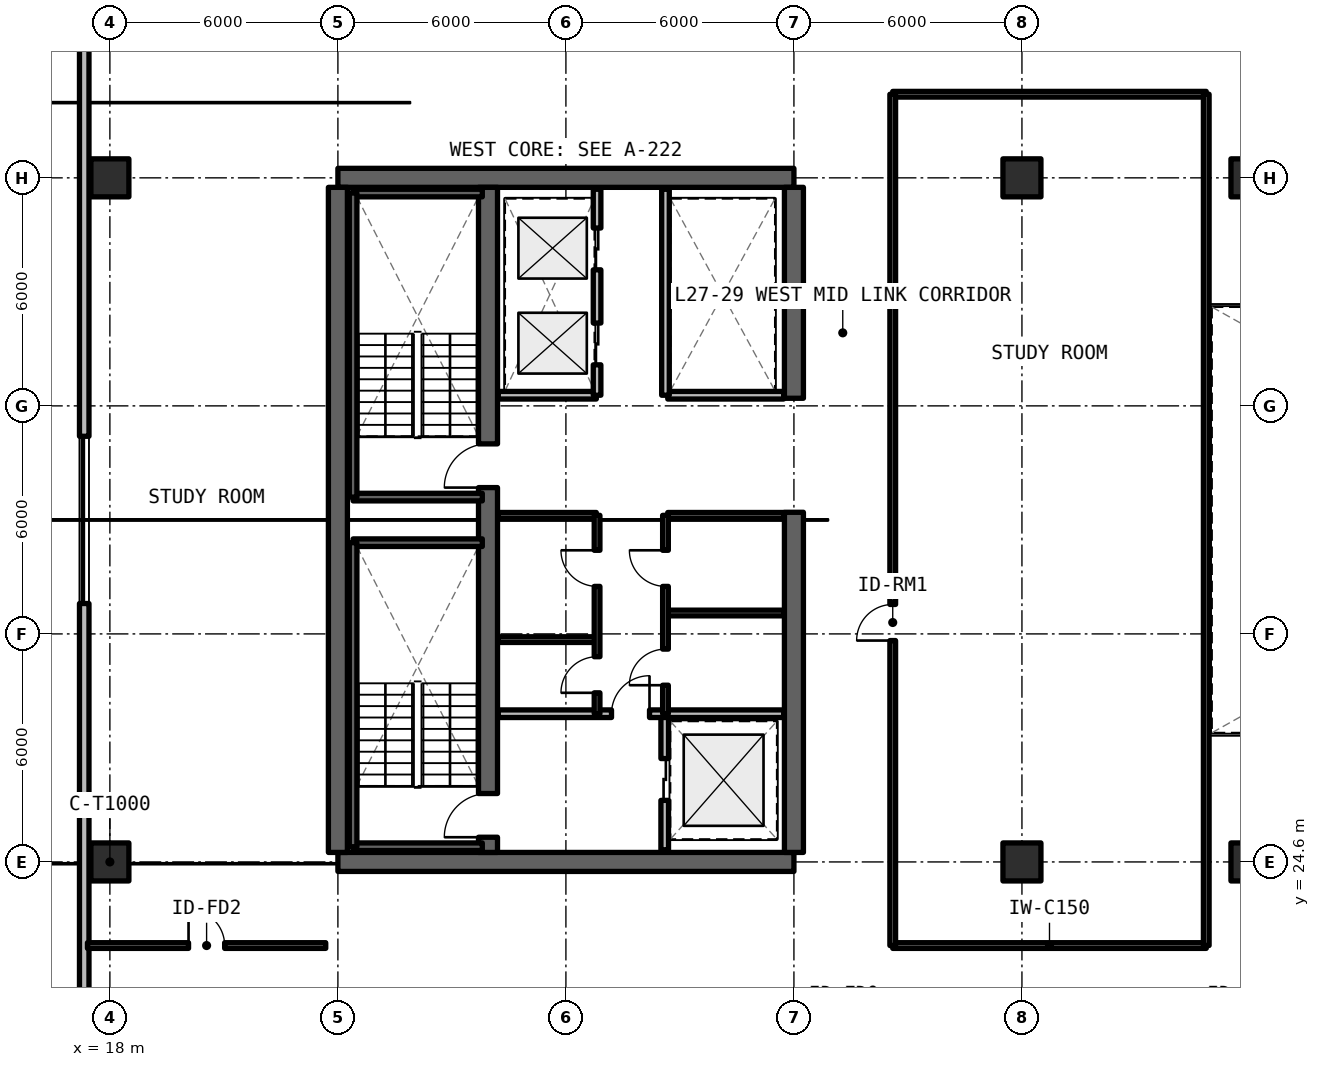
"""IFC4 building model, lengths in metres.
Left out: names, types, materials, properties, quantities, classifications, styles, units other than length and angle.
Written with IfcOpenShell. Run it as: python <this file> out.ifc"""

import sys

from ifc_helpers import new_model, si_unit, direction, frame, frame_2d, origin, origin_2d, place, context, subcontext, project, spatial, rectangle, extrude, element, fill, save


model = new_model("IFC4")
c1 = context("Model", 3, precision=1e-05, world=origin(), true_north=direction((0.0, 1.0)))
c2 = subcontext(c1, "Body", "Model", "MODEL_VIEW")
j1 = project(units=[si_unit("LENGTHUNIT", "METRE"), si_unit("PLANEANGLEUNIT", "RADIAN")], contexts=[c1])
p1 = place(None, origin())
s1 = spatial("IfcSite", under=j1, at=p1, CompositionType="ELEMENT")
p2 = place(p1, origin())
s2 = spatial("IfcBuilding", under=s1, at=p2, CompositionType="ELEMENT")
p3 = place(p2, frame((0.0, 0.0, 98.67)))
s3 = spatial("IfcBuildingStorey", under=s2, at=p3, CompositionType="ELEMENT", Elevation=98.67)
for number, where, z_axis, x_axis in (
    (1, (24.0, 24.6, 0.0), (0.0, 0.0, 1.0), (1.0, 0.0, 0.0)),
    (2, (36.0, 42.6, 0.0), (0.0, 0.0, 1.0), (-1.0, 0.0, 0.0)),
):
    element("IfcWall", number, at=place(p3, frame(where, z_axis=z_axis, x_axis=x_axis)), inside=s3, PredefinedType="SHEAR", context=c2, shape_type="SweptSolid", body=[
        extrude(rectangle(XDim=12.0, YDim=0.5, at=frame_2d((6.0, 0.0))), origin(), (0.0, 0.0, 1.0), 3.3),
    ])
p4 = place(p3, frame((24.0, 24.85, 0.0), z_axis=(0.0, 0.0, 1.0), x_axis=(0.0, 1.0, 0.0)))
e3 = element("IfcWall", 3, at=p4, inside=s3, PredefinedType="SHEAR", context=c2, shape_type="SweptSolid", body=[
    extrude(rectangle(XDim=17.5, YDim=0.5, at=frame_2d((8.75, 0.0))), origin(), (0.0, 0.0, 1.0), 3.3),
])
p5 = place(p3, frame((36.0, 24.85, 0.0), z_axis=(0.0, 0.0, 1.0), x_axis=(0.0, 1.0, 0.0)))
e4 = element("IfcWall", 4, at=p5, inside=s3, PredefinedType="SHEAR", context=c2, shape_type="SweptSolid", body=[
    extrude(rectangle(XDim=8.95, YDim=0.5, at=frame_2d((4.475, 0.0))), origin(), (0.0, 0.0, 1.0), 3.3),
])
p6 = place(p3, frame((36.0, 36.8, 0.0), z_axis=(0.0, 0.0, 1.0), x_axis=(0.0, 1.0, 0.0)))
e5 = element("IfcWall", 5, at=p6, inside=s3, PredefinedType="SHEAR", context=c2, shape_type="SweptSolid", body=[
    extrude(rectangle(XDim=5.55, YDim=0.5, at=frame_2d((2.775, 0.0))), origin(), (0.0, 0.0, 1.0), 3.3),
])
p7 = place(p3, frame((27.95, 24.85, 0.0), z_axis=(0.0, 0.0, 1.0), x_axis=(0.0, 1.0, 0.0)))
e6 = element("IfcWall", 6, at=p7, inside=s3, PredefinedType="SHEAR", context=c2, shape_type="SweptSolid", body=[
    extrude(rectangle(XDim=17.5, YDim=0.5, at=frame_2d((8.75, 0.0))), origin(), (0.0, 0.0, 1.0), 3.3),
])
p8 = place(p7, frame((0.4, 0.0, 0.0)))
e7 = element("IfcOpeningElement", 7, at=p8, cuts=e6, PredefinedType="OPENING", context=c2, shape_type="SweptSolid", body=[
    extrude(rectangle(XDim=1.15, YDim=2.15, at=frame_2d((0.575, 1.075))), frame((0.0, 0.26, 0.0), z_axis=(0.0, -1.0, 0.0), x_axis=(1.0, 0.0, 0.0)), (0.0, 0.0, 1.0), 0.52),
])
p9 = place(p7, frame((9.6, 0.0, 0.0)))
e8 = element("IfcOpeningElement", 8, at=p9, cuts=e6, PredefinedType="OPENING", context=c2, shape_type="SweptSolid", body=[
    extrude(rectangle(XDim=1.15, YDim=2.15, at=frame_2d((0.575, 1.075))), frame((0.0, 0.26, 0.0), z_axis=(0.0, -1.0, 0.0), x_axis=(1.0, 0.0, 0.0)), (0.0, 0.0, 1.0), 0.52),
])
for number, where, z_axis, x_axis in (
    (9, (18.0, 24.6, 0.0), (0.0, 0.0, 1.0), (1.0, 0.0, 0.0)),
    (10, (18.0, 42.6, 0.0), (0.0, 0.0, 1.0), (1.0, 0.0, 0.0)),
    (11, (42.0, 24.6, 0.0), (0.0, 0.0, 1.0), (1.0, 0.0, 0.0)),
    (12, (42.0, 42.6, 0.0), (0.0, 0.0, 1.0), (1.0, 0.0, 0.0)),
    (13, (48.0, 24.6, 0.0), (0.0, 0.0, 1.0), (1.0, 0.0, 0.0)),
    (14, (48.0, 42.6, 0.0), (0.0, 0.0, 1.0), (1.0, 0.0, 0.0)),
):
    element("IfcColumn", number, at=place(p3, frame(where, z_axis=z_axis, x_axis=x_axis)), inside=s3, PredefinedType="COLUMN", context=c2, shape_type="SweptSolid", body=[
        extrude(rectangle(XDim=1.0, YDim=1.0, at=origin_2d()), origin(), (0.0, 0.0, 1.0), 3.3),
    ])
p10 = place(p3, frame((17.325, 53.348, 0.0), z_axis=(0.0, 0.0, 1.0), x_axis=(0.0, -1.0, 0.0)))
e15 = element("IfcWall", 15, at=p10, inside=s3, PredefinedType="SOLIDWALL", context=c2, shape_type="SweptSolid", body=[
    extrude(rectangle(XDim=39.496, YDim=0.25, at=frame_2d((19.748, 0.0))), origin(), (0.0, 0.0, 1.0), 3.08),
])
p11 = place(p10, frame((17.548, 0.0, 0.78)))
e16 = element("IfcOpeningElement", 16, at=p11, cuts=e15, PredefinedType="OPENING", context=c2, shape_type="SweptSolid", body=[
    extrude(rectangle(XDim=4.4, YDim=1.66, at=frame_2d((2.2, 0.83))), frame((0.0, 0.135, 0.0), z_axis=(0.0, -1.0, 0.0), x_axis=(1.0, 0.0, 0.0)), (0.0, 0.0, 1.0), 0.27),
])
p12 = place(p10, frame((35.642, 0.0, 0.78)))
e17 = element("IfcOpeningElement", 17, at=p12, cuts=e15, PredefinedType="OPENING", context=c2, shape_type="SweptSolid", body=[
    extrude(rectangle(XDim=1.4, YDim=1.65, at=frame_2d((0.7, 0.825))), frame((0.0, 0.135, 0.0), z_axis=(0.0, -1.0, 0.0), x_axis=(1.0, 0.0, 0.0)), (0.0, 0.0, 1.0), 0.27),
])
p13 = place(p3, frame((32.6, 24.92, 0.0), z_axis=(0.0, 0.0, 1.0), x_axis=(0.0, 1.0, 0.0)))
e18 = element("IfcWall", 18, at=p13, inside=s3, PredefinedType="SOLIDWALL", context=c2, shape_type="SweptSolid", body=[
    extrude(rectangle(XDim=3.58, YDim=0.2, at=frame_2d((1.79, 0.0))), origin(), (0.0, 0.0, 1.0), 2.35),
])
p14 = place(p13, frame((1.3, 0.0, 0.0)))
e19 = element("IfcOpeningElement", 19, at=p14, cuts=e18, PredefinedType="OPENING", context=c2, shape_type="SweptSolid", body=[
    extrude(rectangle(XDim=1.1, YDim=2.2, at=frame_2d((0.55, 1.1))), frame((0.0, 0.11, 0.0), z_axis=(0.0, -1.0, 0.0), x_axis=(1.0, 0.0, 0.0)), (0.0, 0.0, 1.0), 0.22),
])
p15 = place(p3, frame((28.22, 28.5, 0.0), z_axis=(0.0, 0.0, 1.0), x_axis=(1.0, 0.0, 0.0)))
e20 = element("IfcWall", 20, at=p15, inside=s3, PredefinedType="SOLIDWALL", context=c2, shape_type="SweptSolid", body=[
    extrude(rectangle(XDim=7.51, YDim=0.2, at=frame_2d((3.755, 0.0))), origin(), (0.0, 0.0, 1.0), 2.35),
])
p16 = place(p15, frame((2.98, 0.0, 0.0)))
e21 = element("IfcOpeningElement", 21, at=p16, cuts=e20, PredefinedType="OPENING", context=c2, shape_type="SweptSolid", body=[
    extrude(rectangle(XDim=1.0, YDim=2.15, at=frame_2d((0.5, 1.075))), frame((0.0, 0.11, 0.0), z_axis=(0.0, -1.0, 0.0), x_axis=(1.0, 0.0, 0.0)), (0.0, 0.0, 1.0), 0.22),
])
for number, where, z_axis, x_axis in (
    (22, (28.22, 30.45, 0.0), (0.0, 0.0, 1.0), (1.0, 0.0, 0.0)),
    (23, (28.22, 33.72, 0.0), (0.0, 0.0, 1.0), (1.0, 0.0, 0.0)),
):
    element("IfcWall", number, at=place(p3, frame(where, z_axis=z_axis, x_axis=x_axis)), inside=s3, PredefinedType="SOLIDWALL", context=c2, shape_type="SweptSolid", body=[
        extrude(rectangle(XDim=2.58, YDim=0.15, at=frame_2d((1.29, 0.0))), origin(), (0.0, 0.0, 1.0), 2.35),
    ])
p17 = place(p3, frame((30.82, 28.5, 0.0), z_axis=(0.0, 0.0, 1.0), x_axis=(0.0, 1.0, 0.0)))
e24 = element("IfcWall", 24, at=p17, inside=s3, PredefinedType="SOLIDWALL", context=c2, shape_type="SweptSolid", body=[
    extrude(rectangle(XDim=5.22, YDim=0.15, at=frame_2d((2.61, 0.0))), origin(), (0.0, 0.0, 1.0), 2.35),
])
p18 = place(p17, frame((0.55, 0.0, 0.0)))
e25 = element("IfcOpeningElement", 25, at=p18, cuts=e24, PredefinedType="OPENING", context=c2, shape_type="SweptSolid", body=[
    extrude(rectangle(XDim=0.95, YDim=2.15, at=frame_2d((0.475, 1.075))), frame((0.0, 0.085, 0.0), z_axis=(0.0, -1.0, 0.0), x_axis=(1.0, 0.0, 0.0)), (0.0, 0.0, 1.0), 0.17),
])
p19 = place(p17, frame((3.35, 0.0, 0.0)))
e26 = element("IfcOpeningElement", 26, at=p19, cuts=e24, PredefinedType="OPENING", context=c2, shape_type="SweptSolid", body=[
    extrude(rectangle(XDim=0.95, YDim=2.15, at=frame_2d((0.475, 1.075))), frame((0.0, 0.085, 0.0), z_axis=(0.0, -1.0, 0.0), x_axis=(1.0, 0.0, 0.0)), (0.0, 0.0, 1.0), 0.17),
])
for number, where, z_axis, x_axis in (
    (27, (32.68, 31.15, 0.0), (0.0, 0.0, 1.0), (1.0, 0.0, 0.0)),
    (28, (32.68, 33.72, 0.0), (0.0, 0.0, 1.0), (1.0, 0.0, 0.0)),
):
    element("IfcWall", number, at=place(p3, frame(where, z_axis=z_axis, x_axis=x_axis)), inside=s3, PredefinedType="SOLIDWALL", context=c2, shape_type="SweptSolid", body=[
        extrude(rectangle(XDim=3.05, YDim=0.15, at=frame_2d((1.525, 0.0))), origin(), (0.0, 0.0, 1.0), 2.35),
    ])
p20 = place(p3, frame((32.62, 28.5, 0.0), z_axis=(0.0, 0.0, 1.0), x_axis=(0.0, 1.0, 0.0)))
e29 = element("IfcWall", 29, at=p20, inside=s3, PredefinedType="SOLIDWALL", context=c2, shape_type="SweptSolid", body=[
    extrude(rectangle(XDim=5.22, YDim=0.15, at=frame_2d((2.61, 0.0))), origin(), (0.0, 0.0, 1.0), 2.35),
])
p21 = place(p20, frame((0.75, 0.0, 0.0)))
e30 = element("IfcOpeningElement", 30, at=p21, cuts=e29, PredefinedType="OPENING", context=c2, shape_type="SweptSolid", body=[
    extrude(rectangle(XDim=0.95, YDim=2.15, at=frame_2d((0.475, 1.075))), frame((0.0, 0.085, 0.0), z_axis=(0.0, -1.0, 0.0), x_axis=(1.0, 0.0, 0.0)), (0.0, 0.0, 1.0), 0.17),
])
p22 = place(p20, frame((3.35, 0.0, 0.0)))
e31 = element("IfcOpeningElement", 31, at=p22, cuts=e29, PredefinedType="OPENING", context=c2, shape_type="SweptSolid", body=[
    extrude(rectangle(XDim=0.95, YDim=2.15, at=frame_2d((0.475, 1.075))), frame((0.0, 0.085, 0.0), z_axis=(0.0, -1.0, 0.0), x_axis=(1.0, 0.0, 0.0)), (0.0, 0.0, 1.0), 0.17),
])
p23 = place(p3, frame((28.22, 36.88, 0.0), z_axis=(0.0, 0.0, 1.0), x_axis=(1.0, 0.0, 0.0)))
e32 = element("IfcWall", 32, at=p23, inside=s3, PredefinedType="SOLIDWALL", context=c2, shape_type="SweptSolid", body=[
    extrude(rectangle(XDim=2.58, YDim=0.2, at=frame_2d((1.29, 0.0))), origin(), (0.0, 0.0, 1.0), 2.35),
])
p24 = place(p3, frame((30.82, 36.88, 0.0), z_axis=(0.0, 0.0, 1.0), x_axis=(0.0, 1.0, 0.0)))
e33 = element("IfcWall", 33, at=p24, inside=s3, PredefinedType="SOLIDWALL", context=c2, shape_type="SweptSolid", body=[
    extrude(rectangle(XDim=5.42, YDim=0.2, at=frame_2d((2.71, 0.0))), origin(), (0.0, 0.0, 1.0), 2.35),
])
p25 = place(p24, frame((0.8, 0.0, 0.0)))
e34 = element("IfcOpeningElement", 34, at=p25, cuts=e33, PredefinedType="OPENING", context=c2, shape_type="SweptSolid", body=[
    extrude(rectangle(XDim=1.1, YDim=2.2, at=frame_2d((0.55, 1.1))), frame((0.0, 0.11, 0.0), z_axis=(0.0, -1.0, 0.0), x_axis=(1.0, 0.0, 0.0)), (0.0, 0.0, 1.0), 0.22),
])
p26 = place(p24, frame((3.3, 0.0, 0.0)))
e35 = element("IfcOpeningElement", 35, at=p26, cuts=e33, PredefinedType="OPENING", context=c2, shape_type="SweptSolid", body=[
    extrude(rectangle(XDim=1.1, YDim=2.2, at=frame_2d((0.55, 1.1))), frame((0.0, 0.11, 0.0), z_axis=(0.0, -1.0, 0.0), x_axis=(1.0, 0.0, 0.0)), (0.0, 0.0, 1.0), 0.22),
])
p27 = place(p3, frame((32.68, 36.88, 0.0), z_axis=(0.0, 0.0, 1.0), x_axis=(1.0, 0.0, 0.0)))
e36 = element("IfcWall", 36, at=p27, inside=s3, PredefinedType="SOLIDWALL", context=c2, shape_type="SweptSolid", body=[
    extrude(rectangle(XDim=3.05, YDim=0.2, at=frame_2d((1.525, 0.0))), origin(), (0.0, 0.0, 1.0), 2.35),
])
p28 = place(p3, frame((32.62, 36.88, 0.0), z_axis=(0.0, 0.0, 1.0), x_axis=(0.0, 1.0, 0.0)))
e37 = element("IfcWall", 37, at=p28, inside=s3, PredefinedType="SOLIDWALL", context=c2, shape_type="SweptSolid", body=[
    extrude(rectangle(XDim=5.42, YDim=0.2, at=frame_2d((2.71, 0.0))), origin(), (0.0, 0.0, 1.0), 2.35),
])
for number, where, z_axis, x_axis in (
    (38, (38.6, 22.4, 0.0), (0.0, 0.0, 1.0), (1.0, 0.0, 0.0)),
    (39, (38.6, 44.8, 0.0), (0.0, 0.0, 1.0), (1.0, 0.0, 0.0)),
):
    element("IfcWall", number, at=place(p3, frame(where, z_axis=z_axis, x_axis=x_axis)), inside=s3, PredefinedType="SOLIDWALL", context=c2, shape_type="SweptSolid", body=[
        extrude(rectangle(XDim=8.25, YDim=0.15, at=frame_2d((4.125, 0.0))), origin(), (0.0, 0.0, 1.0), 2.35),
    ])
p29 = place(p3, frame((38.6, 22.4, 0.0), z_axis=(0.0, 0.0, 1.0), x_axis=(0.0, 1.0, 0.0)))
e40 = element("IfcWall", 40, at=p29, inside=s3, PredefinedType="SOLIDWALL", context=c2, shape_type="SweptSolid", body=[
    extrude(rectangle(XDim=22.4, YDim=0.15, at=frame_2d((11.2, 0.0))), origin(), (0.0, 0.0, 1.0), 2.35),
])
p30 = place(p29, frame((8.025, 0.0, 0.0)))
e41 = element("IfcOpeningElement", 41, at=p30, cuts=e40, PredefinedType="OPENING", context=c2, shape_type="SweptSolid", body=[
    extrude(rectangle(XDim=0.95, YDim=2.15, at=frame_2d((0.475, 1.075))), frame((0.0, 0.085, 0.0), z_axis=(0.0, -1.0, 0.0), x_axis=(1.0, 0.0, 0.0)), (0.0, 0.0, 1.0), 0.17),
])
p31 = place(p3, frame((46.85, 22.4, 0.0), z_axis=(0.0, 0.0, 1.0), x_axis=(0.0, 1.0, 0.0)))
e42 = element("IfcWall", 42, at=p31, inside=s3, PredefinedType="SOLIDWALL", context=c2, shape_type="SweptSolid", body=[
    extrude(rectangle(XDim=22.4, YDim=0.15, at=frame_2d((11.2, 0.0))), origin(), (0.0, 0.0, 1.0), 2.35),
])
p32 = place(p3, frame((17.41, 22.4, 0.0), z_axis=(0.0, 0.0, 1.0), x_axis=(1.0, 0.0, 0.0)))
e43 = element("IfcWall", 43, at=p32, inside=s3, PredefinedType="SOLIDWALL", context=c2, shape_type="SweptSolid", body=[
    extrude(rectangle(XDim=6.27, YDim=0.15, at=frame_2d((3.135, 0.0))), origin(), (0.0, 0.0, 1.0), 2.35),
])
p33 = place(p32, frame((2.66, 0.0, 0.0)))
e44 = element("IfcOpeningElement", 44, at=p33, cuts=e43, PredefinedType="OPENING", context=c2, shape_type="SweptSolid", body=[
    extrude(rectangle(XDim=0.95, YDim=2.15, at=frame_2d((0.475, 1.075))), frame((0.0, 0.085, 0.0), z_axis=(0.0, -1.0, 0.0), x_axis=(1.0, 0.0, 0.0)), (0.0, 0.0, 1.0), 0.17),
])
for number, where, z_axis, x_axis in (
    (45, (24.4, 25.0, 0.0), (0.0, 0.0, 1.0), (1.0, 0.0, 0.0)),
    (46, (27.8, 33.0, 0.0), (0.0, 0.0, 1.0), (-1.0, 0.0, 0.0)),
):
    element("IfcWall", number, at=place(p3, frame(where, z_axis=z_axis, x_axis=x_axis)), inside=s3, PredefinedType="SOLIDWALL", context=c2, shape_type="SweptSolid", body=[
        extrude(rectangle(XDim=3.4, YDim=0.2, at=frame_2d((1.7, 0.0))), origin(), (0.0, 0.0, 1.0), 3.3),
    ])
p34 = place(p3, frame((24.4, 33.0, 0.0), z_axis=(0.0, 0.0, 1.0), x_axis=(0.0, -1.0, 0.0)))
e47 = element("IfcWall", 47, at=p34, inside=s3, PredefinedType="SOLIDWALL", context=c2, shape_type="SweptSolid", body=[
    extrude(rectangle(XDim=8.0, YDim=0.2, at=frame_2d((4.0, 0.0))), origin(), (0.0, 0.0, 1.0), 3.3),
])
for number, where, z_axis, x_axis in (
    (48, (24.4, 34.2, 0.0), (0.0, 0.0, 1.0), (1.0, 0.0, 0.0)),
    (49, (27.8, 42.2, 0.0), (0.0, 0.0, 1.0), (-1.0, 0.0, 0.0)),
):
    element("IfcWall", number, at=place(p3, frame(where, z_axis=z_axis, x_axis=x_axis)), inside=s3, PredefinedType="SOLIDWALL", context=c2, shape_type="SweptSolid", body=[
        extrude(rectangle(XDim=3.4, YDim=0.2, at=frame_2d((1.7, 0.0))), origin(), (0.0, 0.0, 1.0), 3.3),
    ])
p35 = place(p3, frame((24.4, 42.2, 0.0), z_axis=(0.0, 0.0, 1.0), x_axis=(0.0, -1.0, 0.0)))
e50 = element("IfcWall", 50, at=p35, inside=s3, PredefinedType="SOLIDWALL", context=c2, shape_type="SweptSolid", body=[
    extrude(rectangle(XDim=8.0, YDim=0.2, at=frame_2d((4.0, 0.0))), origin(), (0.0, 0.0, 1.0), 3.3),
])
p36 = place(p11, origin())
e51 = element("IfcWindow", 51, at=p36, inside=s3, PartitioningType="SINGLE_PANEL", PredefinedType="WINDOW", context=c2, shape_type="SweptSolid", body=[
    extrude(rectangle(XDim=4.4, YDim=1.66, at=frame_2d((2.2, 0.83))), frame((0.0, 0.03, 0.0), z_axis=(0.0, -1.0, 0.0), x_axis=(1.0, 0.0, 0.0)), (0.0, 0.0, 1.0), 0.06),
])
fill(e16, e51)
p37 = place(p14, origin())
e52 = element("IfcDoor", 52, at=p37, inside=s3, OperationType="SLIDING_TO_LEFT", PredefinedType="DOOR", context=c2, shape_type="SweptSolid", body=[
    extrude(rectangle(XDim=1.1, YDim=2.2, at=frame_2d((0.55, 1.1))), frame((0.0, 0.025, 0.0), z_axis=(0.0, -1.0, 0.0), x_axis=(1.0, 0.0, 0.0)), (0.0, 0.0, 1.0), 0.05),
])
fill(e19, e52)
p38 = place(p16, origin())
e53 = element("IfcDoor", 53, at=p38, inside=s3, OperationType="SINGLE_SWING_RIGHT", PredefinedType="DOOR", context=c2, shape_type="SweptSolid", body=[
    extrude(rectangle(XDim=1.0, YDim=2.15, at=frame_2d((0.5, 1.075))), frame((0.0, 0.025, 0.0), z_axis=(0.0, -1.0, 0.0), x_axis=(1.0, 0.0, 0.0)), (0.0, 0.0, 1.0), 0.05),
])
fill(e21, e53)
p39 = place(p18, origin())
e54 = element("IfcDoor", 54, at=p39, inside=s3, OperationType="SINGLE_SWING_LEFT", PredefinedType="DOOR", context=c2, shape_type="SweptSolid", body=[
    extrude(rectangle(XDim=0.95, YDim=2.15, at=frame_2d((0.475, 1.075))), frame((0.0, 0.025, 0.0), z_axis=(0.0, -1.0, 0.0), x_axis=(1.0, 0.0, 0.0)), (0.0, 0.0, 1.0), 0.05),
])
fill(e25, e54)
p40 = place(p19, origin())
e55 = element("IfcDoor", 55, at=p40, inside=s3, OperationType="SINGLE_SWING_RIGHT", PredefinedType="DOOR", context=c2, shape_type="SweptSolid", body=[
    extrude(rectangle(XDim=0.95, YDim=2.15, at=frame_2d((0.475, 1.075))), frame((0.0, 0.025, 0.0), z_axis=(0.0, -1.0, 0.0), x_axis=(1.0, 0.0, 0.0)), (0.0, 0.0, 1.0), 0.05),
])
fill(e26, e55)
p41 = place(p21, origin())
e56 = element("IfcDoor", 56, at=p41, inside=s3, OperationType="SINGLE_SWING_LEFT", PredefinedType="DOOR", context=c2, shape_type="SweptSolid", body=[
    extrude(rectangle(XDim=0.95, YDim=2.15, at=frame_2d((0.475, 1.075))), frame((0.0, 0.025, 0.0), z_axis=(0.0, -1.0, 0.0), x_axis=(1.0, 0.0, 0.0)), (0.0, 0.0, 1.0), 0.05),
])
fill(e30, e56)
p42 = place(p22, origin())
e57 = element("IfcDoor", 57, at=p42, inside=s3, OperationType="SINGLE_SWING_RIGHT", PredefinedType="DOOR", context=c2, shape_type="SweptSolid", body=[
    extrude(rectangle(XDim=0.95, YDim=2.15, at=frame_2d((0.475, 1.075))), frame((0.0, 0.025, 0.0), z_axis=(0.0, -1.0, 0.0), x_axis=(1.0, 0.0, 0.0)), (0.0, 0.0, 1.0), 0.05),
])
fill(e31, e57)
p43 = place(p25, origin())
e58 = element("IfcDoor", 58, at=p43, inside=s3, OperationType="SLIDING_TO_LEFT", PredefinedType="DOOR", context=c2, shape_type="SweptSolid", body=[
    extrude(rectangle(XDim=1.1, YDim=2.2, at=frame_2d((0.55, 1.1))), frame((0.0, 0.025, 0.0), z_axis=(0.0, -1.0, 0.0), x_axis=(1.0, 0.0, 0.0)), (0.0, 0.0, 1.0), 0.05),
])
fill(e34, e58)
p44 = place(p26, origin())
e59 = element("IfcDoor", 59, at=p44, inside=s3, OperationType="SLIDING_TO_RIGHT", PredefinedType="DOOR", context=c2, shape_type="SweptSolid", body=[
    extrude(rectangle(XDim=1.1, YDim=2.2, at=frame_2d((0.55, 1.1))), frame((0.0, 0.025, 0.0), z_axis=(0.0, -1.0, 0.0), x_axis=(1.0, 0.0, 0.0)), (0.0, 0.0, 1.0), 0.05),
])
fill(e35, e59)
p45 = place(p30, origin())
e60 = element("IfcDoor", 60, at=p45, inside=s3, OperationType="SINGLE_SWING_LEFT", PredefinedType="DOOR", context=c2, shape_type="SweptSolid", body=[
    extrude(rectangle(XDim=0.95, YDim=2.15, at=frame_2d((0.475, 1.075))), frame((0.0, 0.025, 0.0), z_axis=(0.0, -1.0, 0.0), x_axis=(1.0, 0.0, 0.0)), (0.0, 0.0, 1.0), 0.05),
])
fill(e41, e60)
p46 = place(p33, origin())
e61 = element("IfcDoor", 61, at=p46, inside=s3, OperationType="SINGLE_SWING_LEFT", PredefinedType="DOOR", context=c2, shape_type="SweptSolid", body=[
    extrude(rectangle(XDim=0.95, YDim=2.15, at=frame_2d((0.475, 1.075))), frame((0.0, 0.025, 0.0), z_axis=(0.0, -1.0, 0.0), x_axis=(1.0, 0.0, 0.0)), (0.0, 0.0, 1.0), 0.05),
])
fill(e44, e61)
p47 = place(p8, origin())
e62 = element("IfcDoor", 62, at=p47, inside=s3, OperationType="SINGLE_SWING_RIGHT", PredefinedType="DOOR", context=c2, shape_type="SweptSolid", body=[
    extrude(rectangle(XDim=1.15, YDim=2.15, at=frame_2d((0.575, 1.075))), frame((0.0, 0.025, 0.0), z_axis=(0.0, -1.0, 0.0), x_axis=(1.0, 0.0, 0.0)), (0.0, 0.0, 1.0), 0.05),
])
fill(e7, e62)
p48 = place(p9, origin())
e63 = element("IfcDoor", 63, at=p48, inside=s3, OperationType="SINGLE_SWING_LEFT", PredefinedType="DOOR", context=c2, shape_type="SweptSolid", body=[
    extrude(rectangle(XDim=1.15, YDim=2.15, at=frame_2d((0.575, 1.075))), frame((0.0, 0.025, 0.0), z_axis=(0.0, -1.0, 0.0), x_axis=(1.0, 0.0, 0.0)), (0.0, 0.0, 1.0), 0.05),
])
fill(e8, e63)
save(model, sys.argv[1])
